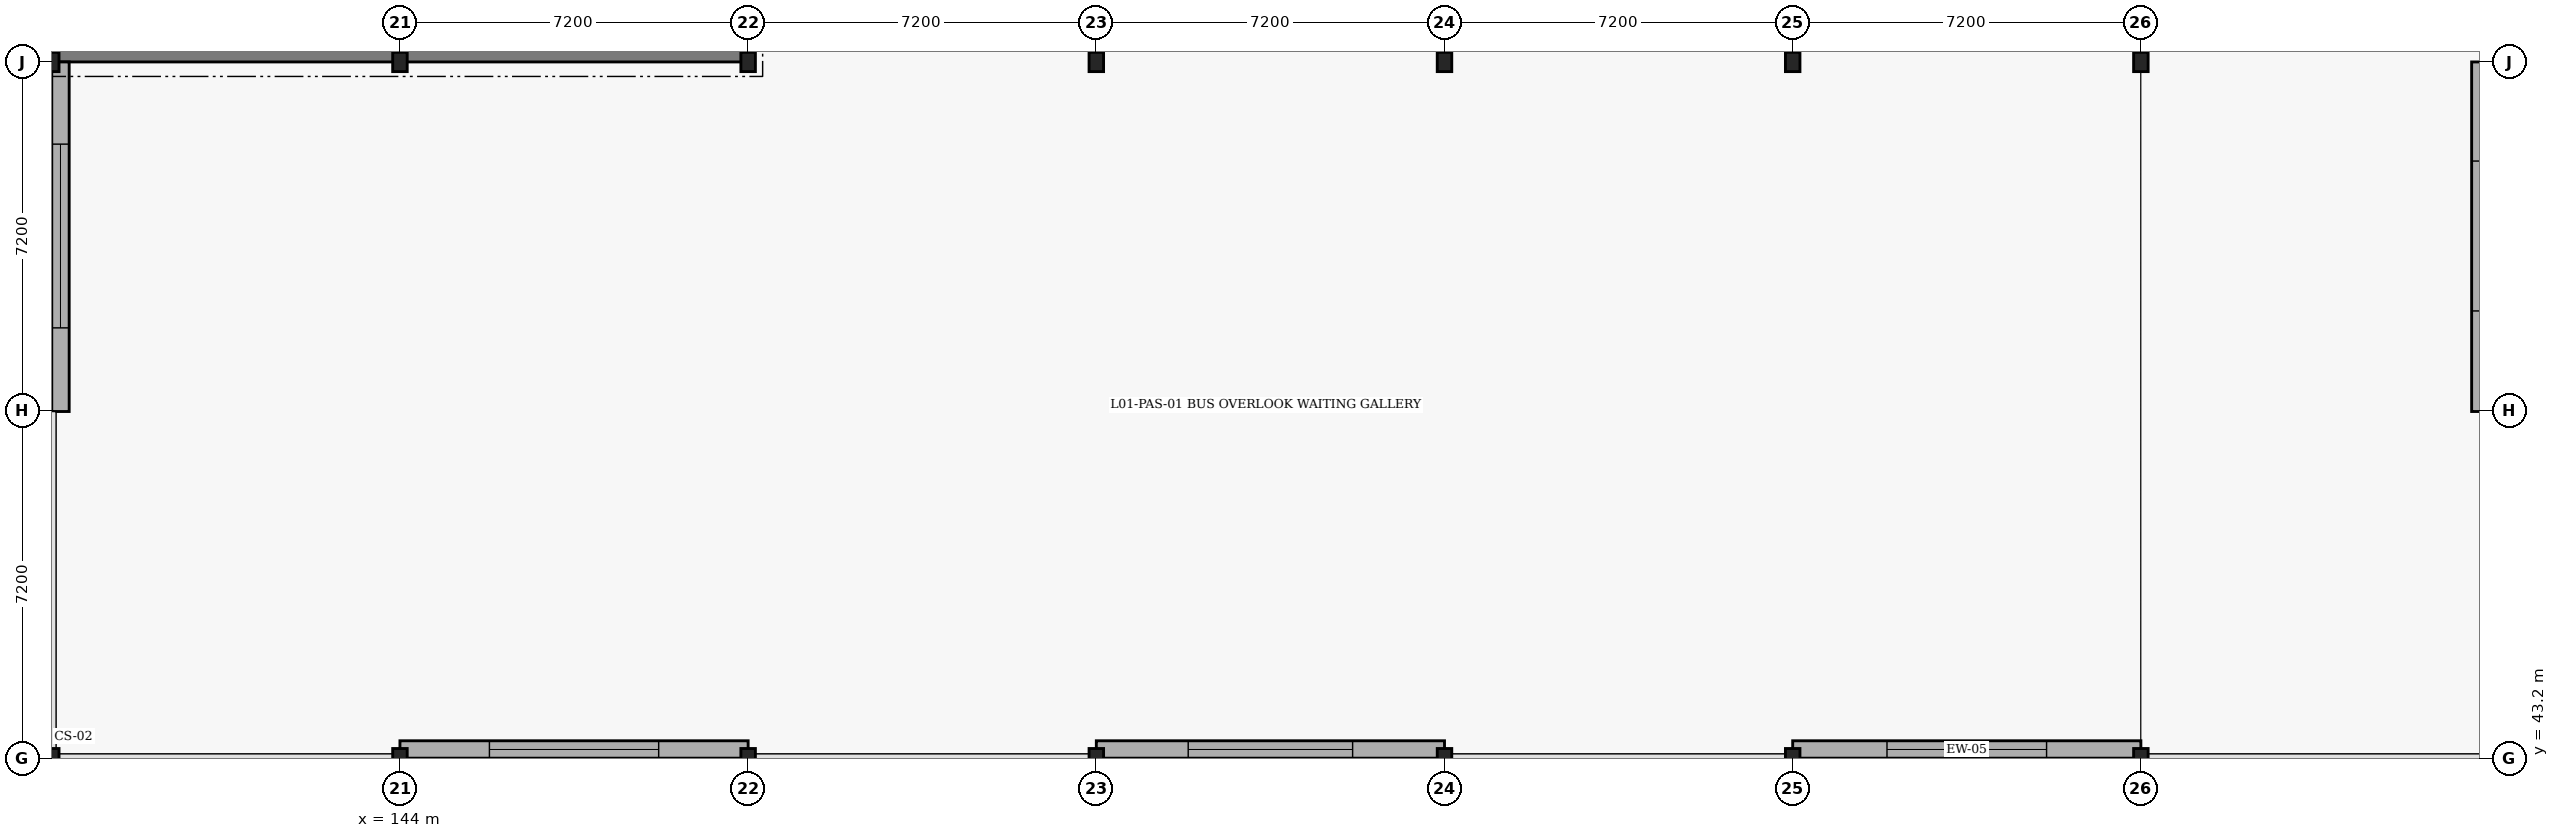
"""IFC4 building model, lengths in metres.
Left out: names, types, materials, properties, quantities, classifications, styles, units other than length and angle.
Written with IfcOpenShell. Run it as: python <this file> out.ifc"""

import sys

from ifc_helpers import new_model, si_unit, direction, frame, frame_2d, origin, origin_2d, place, context, subcontext, project, spatial, rectangle, i_section, extrude, element, fill, save


model = new_model("IFC4")
c1 = context("Model", 3, precision=1e-05, world=origin(), true_north=direction((0.0, 1.0)))
c2 = subcontext(c1, "Body", "Model", "MODEL_VIEW")
j1 = project(units=[si_unit("LENGTHUNIT", "METRE"), si_unit("PLANEANGLEUNIT", "RADIAN")], contexts=[c1])
p1 = place(None, origin())
s1 = spatial("IfcSite", under=j1, at=p1, CompositionType="ELEMENT")
p2 = place(p1, origin())
s2 = spatial("IfcBuilding", under=s1, at=p2, CompositionType="ELEMENT")
p3 = place(p2, frame((0.0, 0.0, 5.4)))
s3 = spatial("IfcBuildingStorey", under=s2, at=p3, CompositionType="ELEMENT", Elevation=5.4)
p4 = place(p3, frame((151.2, 57.75, 0.0), z_axis=(0.0, 0.0, 1.0), x_axis=(-1.0, 0.0, 0.0)))
e1 = element("IfcWall", 1, at=p4, inside=s3, PredefinedType="SHEAR", context=c2, shape_type="SweptSolid", body=[
    extrude(rectangle(XDim=14.4, YDim=0.3, at=frame_2d((7.2, 0.0))), origin(), (0.0, 0.0, 1.0), 4.2),
])
p5 = place(p3, frame((136.8, 43.2, 0.0), z_axis=(0.0, 0.0, 1.0), x_axis=(1.0, 0.0, 0.0)))
e2 = element("IfcColumn", 2, at=p5, inside=s3, PredefinedType="COLUMN", context=c2, shape_type="SweptSolid", body=[
    extrude(i_section(OverallWidth=0.3, OverallDepth=0.4, WebThickness=0.013, FlangeThickness=0.024, FilletRadius=0.027, at=origin_2d()), origin(), (0.0, 0.0, 1.0), 3.95),
])
p6 = place(p3, frame((136.8, 57.6, 0.0), z_axis=(0.0, 0.0, 1.0), x_axis=(1.0, 0.0, 0.0)))
e3 = element("IfcColumn", 3, at=p6, inside=s3, PredefinedType="COLUMN", context=c2, shape_type="SweptSolid", body=[
    extrude(i_section(OverallWidth=0.3, OverallDepth=0.4, WebThickness=0.013, FlangeThickness=0.024, FilletRadius=0.027, at=origin_2d()), origin(), (0.0, 0.0, 1.0), 3.9),
])
p7 = place(p3, frame((144.0, 43.2, 0.0), z_axis=(0.0, 0.0, 1.0), x_axis=(1.0, 0.0, 0.0)))
e4 = element("IfcColumn", 4, at=p7, inside=s3, PredefinedType="COLUMN", context=c2, shape_type="SweptSolid", body=[
    extrude(i_section(OverallWidth=0.3, OverallDepth=0.4, WebThickness=0.013, FlangeThickness=0.024, FilletRadius=0.027, at=origin_2d()), origin(), (0.0, 0.0, 1.0), 3.95),
])
p8 = place(p3, frame((144.0, 57.6, 0.0), z_axis=(0.0, 0.0, 1.0), x_axis=(1.0, 0.0, 0.0)))
e5 = element("IfcColumn", 5, at=p8, inside=s3, PredefinedType="COLUMN", context=c2, shape_type="SweptSolid", body=[
    extrude(i_section(OverallWidth=0.3, OverallDepth=0.4, WebThickness=0.013, FlangeThickness=0.024, FilletRadius=0.027, at=origin_2d()), origin(), (0.0, 0.0, 1.0), 3.9),
])
p9 = place(p3, frame((151.2, 43.2, 0.0), z_axis=(0.0, 0.0, 1.0), x_axis=(1.0, 0.0, 0.0)))
e6 = element("IfcColumn", 6, at=p9, inside=s3, PredefinedType="COLUMN", context=c2, shape_type="SweptSolid", body=[
    extrude(i_section(OverallWidth=0.3, OverallDepth=0.4, WebThickness=0.013, FlangeThickness=0.024, FilletRadius=0.027, at=origin_2d()), origin(), (0.0, 0.0, 1.0), 3.95),
])
p10 = place(p3, frame((151.2, 57.6, 0.0), z_axis=(0.0, 0.0, 1.0), x_axis=(1.0, 0.0, 0.0)))
e7 = element("IfcColumn", 7, at=p10, inside=s3, PredefinedType="COLUMN", context=c2, shape_type="SweptSolid", body=[
    extrude(i_section(OverallWidth=0.3, OverallDepth=0.4, WebThickness=0.013, FlangeThickness=0.024, FilletRadius=0.027, at=origin_2d()), origin(), (0.0, 0.0, 1.0), 3.9),
])
p11 = place(p3, frame((158.4, 43.2, 0.0), z_axis=(0.0, 0.0, 1.0), x_axis=(1.0, 0.0, 0.0)))
e8 = element("IfcColumn", 8, at=p11, inside=s3, PredefinedType="COLUMN", context=c2, shape_type="SweptSolid", body=[
    extrude(i_section(OverallWidth=0.3, OverallDepth=0.4, WebThickness=0.013, FlangeThickness=0.024, FilletRadius=0.027, at=origin_2d()), origin(), (0.0, 0.0, 1.0), 3.95),
])
p12 = place(p3, frame((158.4, 57.6, 0.0), z_axis=(0.0, 0.0, 1.0), x_axis=(1.0, 0.0, 0.0)))
e9 = element("IfcColumn", 9, at=p12, inside=s3, PredefinedType="COLUMN", context=c2, shape_type="SweptSolid", body=[
    extrude(i_section(OverallWidth=0.3, OverallDepth=0.4, WebThickness=0.013, FlangeThickness=0.024, FilletRadius=0.027, at=origin_2d()), origin(), (0.0, 0.0, 1.0), 3.9),
])
p13 = place(p3, frame((165.6, 43.2, 0.0), z_axis=(0.0, 0.0, 1.0), x_axis=(1.0, 0.0, 0.0)))
e10 = element("IfcColumn", 10, at=p13, inside=s3, PredefinedType="COLUMN", context=c2, shape_type="SweptSolid", body=[
    extrude(i_section(OverallWidth=0.3, OverallDepth=0.4, WebThickness=0.013, FlangeThickness=0.024, FilletRadius=0.027, at=origin_2d()), origin(), (0.0, 0.0, 1.0), 3.95),
])
p14 = place(p3, frame((165.6, 57.6, 0.0), z_axis=(0.0, 0.0, 1.0), x_axis=(1.0, 0.0, 0.0)))
e11 = element("IfcColumn", 11, at=p14, inside=s3, PredefinedType="COLUMN", context=c2, shape_type="SweptSolid", body=[
    extrude(i_section(OverallWidth=0.3, OverallDepth=0.4, WebThickness=0.013, FlangeThickness=0.024, FilletRadius=0.027, at=origin_2d()), origin(), (0.0, 0.0, 1.0), 3.9),
])
p15 = place(p3, frame((172.8, 43.2, 0.0), z_axis=(0.0, 0.0, 1.0), x_axis=(1.0, 0.0, 0.0)))
e12 = element("IfcColumn", 12, at=p15, inside=s3, PredefinedType="COLUMN", context=c2, shape_type="SweptSolid", body=[
    extrude(i_section(OverallWidth=0.3, OverallDepth=0.4, WebThickness=0.013, FlangeThickness=0.024, FilletRadius=0.027, at=origin_2d()), origin(), (0.0, 0.0, 1.0), 3.95),
])
p16 = place(p3, frame((172.8, 57.6, 0.0), z_axis=(0.0, 0.0, 1.0), x_axis=(1.0, 0.0, 0.0)))
e13 = element("IfcColumn", 13, at=p16, inside=s3, PredefinedType="COLUMN", context=c2, shape_type="SweptSolid", body=[
    extrude(i_section(OverallWidth=0.3, OverallDepth=0.4, WebThickness=0.013, FlangeThickness=0.024, FilletRadius=0.027, at=origin_2d()), origin(), (0.0, 0.0, 1.0), 3.9),
])
p17 = place(p3, frame((180.0, 43.2, 0.0), z_axis=(0.0, 0.0, 1.0), x_axis=(1.0, 0.0, 0.0)))
e14 = element("IfcColumn", 14, at=p17, inside=s3, PredefinedType="COLUMN", context=c2, shape_type="SweptSolid", body=[
    extrude(i_section(OverallWidth=0.3, OverallDepth=0.4, WebThickness=0.013, FlangeThickness=0.024, FilletRadius=0.027, at=origin_2d()), origin(), (0.0, 0.0, 1.0), 3.95),
])
p18 = place(p3, frame((180.0, 57.6, 0.0), z_axis=(0.0, 0.0, 1.0), x_axis=(1.0, 0.0, 0.0)))
e15 = element("IfcColumn", 15, at=p18, inside=s3, PredefinedType="COLUMN", context=c2, shape_type="SweptSolid", body=[
    extrude(i_section(OverallWidth=0.3, OverallDepth=0.4, WebThickness=0.013, FlangeThickness=0.024, FilletRadius=0.027, at=origin_2d()), origin(), (0.0, 0.0, 1.0), 3.9),
])
p19 = place(p3, frame((187.02, 57.6, 0.0), z_axis=(0.0, 0.0, 1.0), x_axis=(0.0, -1.0, 0.0)))
e16 = element("IfcWall", 16, at=p19, inside=s3, PredefinedType="SOLIDWALL", context=c2, shape_type="SweptSolid", body=[
    extrude(rectangle(XDim=7.23, YDim=0.36, at=frame_2d((3.615, 0.0))), origin(), (0.0, 0.0, 1.0), 3.25),
])
p20 = place(p19, frame((2.05, 0.0, 0.9)))
e17 = element("IfcOpeningElement", 17, at=p20, cuts=e16, PredefinedType="OPENING", context=c2, shape_type="SweptSolid", body=[
    extrude(rectangle(XDim=3.1, YDim=1.8, at=frame_2d((1.55, 0.9))), frame((0.0, 0.19, 0.0), z_axis=(0.0, -1.0, 0.0), x_axis=(1.0, 0.0, 0.0)), (0.0, 0.0, 1.0), 0.38),
])
p21 = place(p3, frame((180.0, 43.38, 0.0), z_axis=(0.0, 0.0, 1.0), x_axis=(-1.0, 0.0, 0.0)))
e18 = element("IfcWall", 18, at=p21, inside=s3, PredefinedType="SOLIDWALL", context=c2, shape_type="SweptSolid", body=[
    extrude(rectangle(XDim=7.2, YDim=0.36, at=frame_2d((3.6, 0.0))), origin(), (0.0, 0.0, 1.0), 3.65),
])
p22 = place(p21, frame((1.95, 0.0, 0.9)))
e19 = element("IfcOpeningElement", 19, at=p22, cuts=e18, PredefinedType="OPENING", context=c2, shape_type="SweptSolid", body=[
    extrude(rectangle(XDim=3.3, YDim=1.65, at=frame_2d((1.65, 0.825))), frame((0.0, 0.19, 0.0), z_axis=(0.0, -1.0, 0.0), x_axis=(1.0, 0.0, 0.0)), (0.0, 0.0, 1.0), 0.38),
])
p23 = place(p3, frame((165.6, 43.38, 0.0), z_axis=(0.0, 0.0, 1.0), x_axis=(-1.0, 0.0, 0.0)))
e20 = element("IfcWall", 20, at=p23, inside=s3, PredefinedType="SOLIDWALL", context=c2, shape_type="SweptSolid", body=[
    extrude(rectangle(XDim=7.2, YDim=0.36, at=frame_2d((3.6, 0.0))), origin(), (0.0, 0.0, 1.0), 3.65),
])
p24 = place(p23, frame((1.9, 0.0, 0.9)))
e21 = element("IfcOpeningElement", 21, at=p24, cuts=e20, PredefinedType="OPENING", context=c2, shape_type="SweptSolid", body=[
    extrude(rectangle(XDim=3.4, YDim=1.75, at=frame_2d((1.7, 0.875))), frame((0.0, 0.19, 0.0), z_axis=(0.0, -1.0, 0.0), x_axis=(1.0, 0.0, 0.0)), (0.0, 0.0, 1.0), 0.38),
])
p25 = place(p3, frame((151.2, 43.38, 0.0), z_axis=(0.0, 0.0, 1.0), x_axis=(-1.0, 0.0, 0.0)))
e22 = element("IfcWall", 22, at=p25, inside=s3, PredefinedType="SOLIDWALL", context=c2, shape_type="SweptSolid", body=[
    extrude(rectangle(XDim=7.2, YDim=0.36, at=frame_2d((3.6, 0.0))), origin(), (0.0, 0.0, 1.0), 3.65),
])
p26 = place(p25, frame((1.85, 0.0, 0.9)))
e23 = element("IfcOpeningElement", 23, at=p26, cuts=e22, PredefinedType="OPENING", context=c2, shape_type="SweptSolid", body=[
    extrude(rectangle(XDim=3.5, YDim=1.8, at=frame_2d((1.75, 0.9))), frame((0.0, 0.19, 0.0), z_axis=(0.0, -1.0, 0.0), x_axis=(1.0, 0.0, 0.0)), (0.0, 0.0, 1.0), 0.38),
])
p27 = place(p3, frame((136.98, 50.37, 0.0), z_axis=(0.0, 0.0, 1.0), x_axis=(0.0, 1.0, 0.0)))
e24 = element("IfcWall", 24, at=p27, inside=s3, PredefinedType="SOLIDWALL", context=c2, shape_type="SweptSolid", body=[
    extrude(rectangle(XDim=7.23, YDim=0.36, at=frame_2d((3.615, 0.0))), origin(), (0.0, 0.0, 1.0), 3.25),
])
p28 = place(p27, frame((1.73, 0.0, 0.9)))
e25 = element("IfcOpeningElement", 25, at=p28, cuts=e24, PredefinedType="OPENING", context=c2, shape_type="SweptSolid", body=[
    extrude(rectangle(XDim=3.8, YDim=1.85, at=frame_2d((1.9, 0.925))), frame((0.0, 0.19, 0.0), z_axis=(0.0, -1.0, 0.0), x_axis=(1.0, 0.0, 0.0)), (0.0, 0.0, 1.0), 0.38),
])
p29 = place(p20, origin())
e26 = element("IfcWindow", 26, at=p29, inside=s3, PartitioningType="SINGLE_PANEL", PredefinedType="WINDOW", context=c2, shape_type="SweptSolid", body=[
    extrude(rectangle(XDim=3.1, YDim=1.8, at=frame_2d((1.55, 0.9))), frame((0.0, 0.03, 0.0), z_axis=(0.0, -1.0, 0.0), x_axis=(1.0, 0.0, 0.0)), (0.0, 0.0, 1.0), 0.06),
])
fill(e17, e26)
p30 = place(p22, origin())
e27 = element("IfcWindow", 27, at=p30, inside=s3, PartitioningType="SINGLE_PANEL", PredefinedType="WINDOW", context=c2, shape_type="SweptSolid", body=[
    extrude(rectangle(XDim=3.3, YDim=1.65, at=frame_2d((1.65, 0.825))), frame((0.0, 0.03, 0.0), z_axis=(0.0, -1.0, 0.0), x_axis=(1.0, 0.0, 0.0)), (0.0, 0.0, 1.0), 0.06),
])
fill(e19, e27)
p31 = place(p24, origin())
e28 = element("IfcWindow", 28, at=p31, inside=s3, PartitioningType="SINGLE_PANEL", PredefinedType="WINDOW", context=c2, shape_type="SweptSolid", body=[
    extrude(rectangle(XDim=3.4, YDim=1.75, at=frame_2d((1.7, 0.875))), frame((0.0, 0.03, 0.0), z_axis=(0.0, -1.0, 0.0), x_axis=(1.0, 0.0, 0.0)), (0.0, 0.0, 1.0), 0.06),
])
fill(e21, e28)
p32 = place(p26, origin())
e29 = element("IfcWindow", 29, at=p32, inside=s3, PartitioningType="SINGLE_PANEL", PredefinedType="WINDOW", context=c2, shape_type="SweptSolid", body=[
    extrude(rectangle(XDim=3.5, YDim=1.8, at=frame_2d((1.75, 0.9))), frame((0.0, 0.03, 0.0), z_axis=(0.0, -1.0, 0.0), x_axis=(1.0, 0.0, 0.0)), (0.0, 0.0, 1.0), 0.06),
])
fill(e23, e29)
p33 = place(p28, origin())
e30 = element("IfcWindow", 30, at=p33, inside=s3, PartitioningType="SINGLE_PANEL", PredefinedType="WINDOW", context=c2, shape_type="SweptSolid", body=[
    extrude(rectangle(XDim=3.8, YDim=1.85, at=frame_2d((1.9, 0.925))), frame((0.0, 0.03, 0.0), z_axis=(0.0, -1.0, 0.0), x_axis=(1.0, 0.0, 0.0)), (0.0, 0.0, 1.0), 0.06),
])
fill(e25, e30)
save(model, sys.argv[1])
